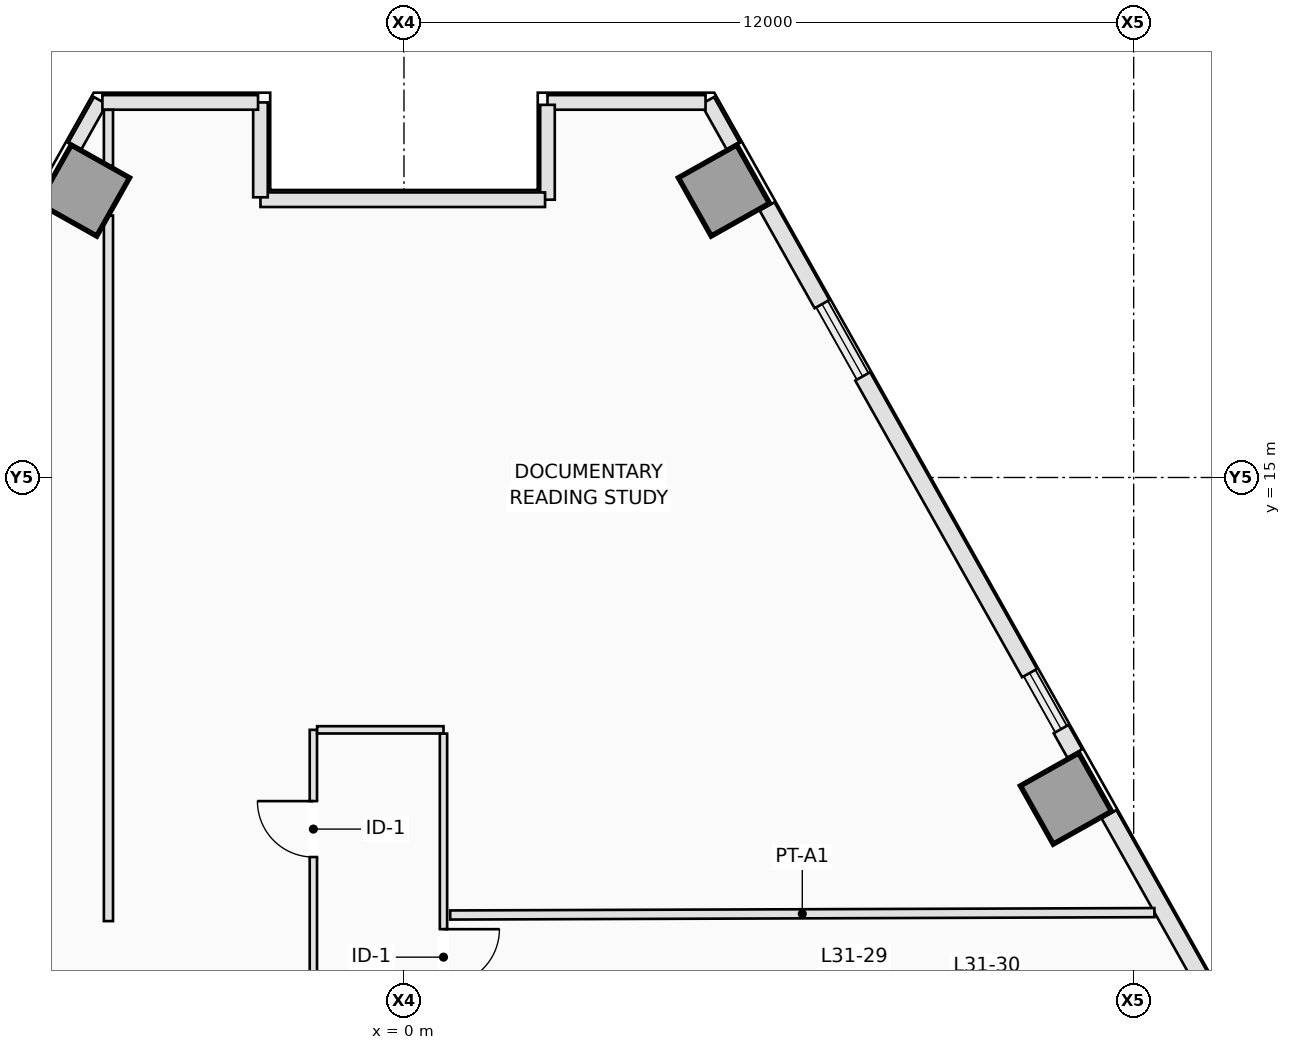
"""IFC4 building model, lengths in metres.
Left out: names, types, materials, properties, quantities, classifications, styles, units other than length and angle.
Written with IfcOpenShell. Run it as: python <this file> out.ifc"""

import sys

from ifc_helpers import new_model, si_unit, direction, frame, frame_2d, origin, origin_2d, place, context, subcontext, project, spatial, rectangle, extrude, element, fill, save


model = new_model("IFC4")
c1 = context("Model", 3, precision=1e-05, world=origin(), true_north=direction((0.0, 1.0)))
c2 = subcontext(c1, "Body", "Model", "MODEL_VIEW")
j1 = project(units=[si_unit("LENGTHUNIT", "METRE"), si_unit("PLANEANGLEUNIT", "RADIAN")], contexts=[c1])
p1 = place(None, origin())
s1 = spatial("IfcSite", under=j1, at=p1, CompositionType="ELEMENT")
p2 = place(p1, origin())
s2 = spatial("IfcBuilding", under=s1, at=p2, CompositionType="ELEMENT")
p3 = place(p2, frame((0.0, 0.0, 116.0)))
s3 = spatial("IfcBuildingStorey", under=s2, at=p3, CompositionType="ELEMENT", Elevation=116.0)
for number, where, z_axis, x_axis in (
    (1, (10.887, 9.72, 0.0), (0.0, 0.0, 1.0), (0.872, 0.49, 0.0)),
    (2, (5.262, 19.719, 0.0), (0.0, 0.0, 1.0), (0.872, 0.49, 0.0)),
    (3, (-5.262, 19.719, 0.0), (0.0, 0.0, 1.0), (-0.872, 0.49, 0.0)),
):
    element("IfcColumn", number, at=place(p3, frame(where, z_axis=z_axis, x_axis=x_axis)), inside=s3, PredefinedType="COLUMN", context=c2, shape_type="SweptSolid", body=[
        extrude(rectangle(XDim=1.1, YDim=1.1, at=origin_2d()), origin(), (0.0, 0.0, 1.0), 3.5),
    ])
p4 = place(p3, frame((4.993, 21.197, 0.0), z_axis=(0.0, 0.0, 1.0), x_axis=(0.490355003566, -0.871522788272, 0.0)))
e4 = element("IfcWall", 4, at=p4, inside=s3, PredefinedType="STANDARD", context=c2, shape_type="SweptSolid", body=[
    extrude(rectangle(XDim=0.865, YDim=0.24, at=frame_2d((0.433, 0.0))), origin(), (0.0, 0.0, 1.0), 3.25),
])
p5 = place(p3, frame((5.971, 19.458, 0.0), z_axis=(0.0, 0.0, 1.0), x_axis=(0.490280102884, -0.871564926277, 0.0)))
e5 = element("IfcWall", 5, at=p5, inside=s3, PredefinedType="STANDARD", context=c2, shape_type="SweptSolid", body=[
    extrude(rectangle(XDim=1.844, YDim=0.28, at=frame_2d((0.922, 0.0))), origin(), (0.0, 0.0, 1.0), 3.25),
])
p6 = place(p3, frame((7.544, 16.662, 0.0), z_axis=(0.0, 0.0, 1.0), x_axis=(0.490298514233, -0.871554569113, 0.0)))
e6 = element("IfcWall", 6, at=p6, inside=s3, PredefinedType="STANDARD", context=c2, shape_type="SweptSolid", body=[
    extrude(rectangle(XDim=5.597, YDim=0.28, at=frame_2d((2.799, 0.0))), origin(), (0.0, 0.0, 1.0), 3.25),
])
p7 = place(p3, frame((10.806, 10.862, 0.0), z_axis=(0.0, 0.0, 1.0), x_axis=(0.490412424957, -0.871490478116, 0.0)))
e7 = element("IfcWall", 7, at=p7, inside=s3, PredefinedType="STANDARD", context=c2, shape_type="SweptSolid", body=[
    extrude(rectangle(XDim=0.46, YDim=0.28, at=frame_2d((0.23, 0.0))), origin(), (0.0, 0.0, 1.0), 3.25),
])
p8 = place(p3, frame((11.593, 9.463, 0.0), z_axis=(0.0, 0.0, 1.0), x_axis=(0.490293592365, -0.871557337922, 0.0)))
e8 = element("IfcWall", 8, at=p8, inside=s3, PredefinedType="STANDARD", context=c2, shape_type="SweptSolid", body=[
    extrude(rectangle(XDim=4.299, YDim=0.28, at=frame_2d((2.15, 0.0))), origin(), (0.0, 0.0, 1.0), 3.25),
])
p9 = place(p3, frame((-5.417, 20.443, 0.0), z_axis=(0.0, 0.0, 1.0), x_axis=(0.490355003566, 0.871522788272, 0.0)))
e9 = element("IfcWall", 9, at=p9, inside=s3, PredefinedType="STANDARD", context=c2, shape_type="SweptSolid", body=[
    extrude(rectangle(XDim=0.865, YDim=0.24, at=frame_2d((0.433, 0.0))), origin(), (0.0, 0.0, 1.0), 3.25),
])
p10 = place(p3, frame((4.959, 21.168, 0.0), z_axis=(0.0, 0.0, 1.0), x_axis=(-1.0, 0.0, 0.0)))
e10 = element("IfcWall", 10, at=p10, inside=s3, PredefinedType="STANDARD", context=c2, shape_type="SweptSolid", body=[
    extrude(rectangle(XDim=2.599, YDim=0.24, at=frame_2d((1.3, 0.0))), origin(), (0.0, 0.0, 1.0), 3.25),
])
p11 = place(p3, frame((2.36, 21.128, 0.0), z_axis=(0.0, 0.0, 1.0), x_axis=(0.0, -1.0, 0.0)))
e11 = element("IfcWall", 11, at=p11, inside=s3, PredefinedType="STANDARD", context=c2, shape_type="SweptSolid", body=[
    extrude(rectangle(XDim=1.56, YDim=0.24, at=frame_2d((0.78, 0.0))), origin(), (0.0, 0.0, 1.0), 3.25),
])
p12 = place(p3, frame((2.32, 19.568, 0.0), z_axis=(0.0, 0.0, 1.0), x_axis=(-1.0, 0.0, 0.0)))
e12 = element("IfcWall", 12, at=p12, inside=s3, PredefinedType="STANDARD", context=c2, shape_type="SweptSolid", body=[
    extrude(rectangle(XDim=4.68, YDim=0.24, at=frame_2d((2.34, 0.0))), origin(), (0.0, 0.0, 1.0), 2.722),
])
p13 = place(p3, frame((-2.36, 19.608, 0.0), z_axis=(0.0, 0.0, 1.0), x_axis=(0.0, 1.0, 0.0)))
e13 = element("IfcWall", 13, at=p13, inside=s3, PredefinedType="STANDARD", context=c2, shape_type="SweptSolid", body=[
    extrude(rectangle(XDim=1.56, YDim=0.24, at=frame_2d((0.78, 0.0))), origin(), (0.0, 0.0, 1.0), 3.25),
])
p14 = place(p3, frame((-2.4, 21.168, 0.0), z_axis=(0.0, 0.0, 1.0), x_axis=(-1.0, 0.0, 0.0)))
e14 = element("IfcWall", 14, at=p14, inside=s3, PredefinedType="STANDARD", context=c2, shape_type="SweptSolid", body=[
    extrude(rectangle(XDim=2.56, YDim=0.24, at=frame_2d((1.28, 0.0))), origin(), (0.0, 0.0, 1.0), 3.25),
])
p15 = place(p3, frame((-1.49, -2.338, 0.0), z_axis=(0.0, 0.0, 1.0), x_axis=(0.0, 1.0, 0.0)))
e15 = element("IfcWall", 15, at=p15, inside=s3, PredefinedType="PARTITIONING", context=c2, shape_type="SweptSolid", body=[
    extrude(rectangle(XDim=13.188, YDim=0.12, at=frame_2d((6.594, 0.0))), origin(), (0.0, 0.0, 1.0), 3.25),
])
p16 = place(p15, frame((11.096, 0.0, 0.0)))
e16 = element("IfcOpeningElement", 16, at=p16, cuts=e15, PredefinedType="OPENING", context=c2, shape_type="SweptSolid", body=[
    extrude(rectangle(XDim=0.92, YDim=2.12, at=frame_2d((0.46, 1.06))), frame((0.0, 0.07, 0.0), z_axis=(0.0, -1.0, 0.0), x_axis=(1.0, 0.0, 0.0)), (0.0, 0.0, 1.0), 0.14),
])
p17 = place(p15, frame((5.078, 0.0, 0.0)))
e17 = element("IfcOpeningElement", 17, at=p17, cuts=e15, PredefinedType="OPENING", context=c2, shape_type="SweptSolid", body=[
    extrude(rectangle(XDim=0.92, YDim=2.12, at=frame_2d((0.46, 1.06))), frame((0.0, 0.07, 0.0), z_axis=(0.0, -1.0, 0.0), x_axis=(1.0, 0.0, 0.0)), (0.0, 0.0, 1.0), 0.14),
])
p18 = place(p15, frame((1.622, 0.0, 0.0)))
e18 = element("IfcOpeningElement", 18, at=p18, cuts=e15, PredefinedType="OPENING", context=c2, shape_type="SweptSolid", body=[
    extrude(rectangle(XDim=0.92, YDim=2.12, at=frame_2d((0.46, 1.06))), frame((0.0, 0.07, 0.0), z_axis=(0.0, -1.0, 0.0), x_axis=(1.0, 0.0, 0.0)), (0.0, 0.0, 1.0), 0.14),
])
p19 = place(p3, frame((-1.428, 10.85, 0.0), z_axis=(0.0, 0.0, 1.0), x_axis=(1.0, 0.0, 0.0)))
e19 = element("IfcWall", 19, at=p19, inside=s3, PredefinedType="PARTITIONING", context=c2, shape_type="SweptSolid", body=[
    extrude(rectangle(XDim=2.078, YDim=0.12, at=frame_2d((1.039, 0.0))), origin(), (0.0, 0.0, 1.0), 3.25),
])
p20 = place(p3, frame((0.65, 10.788, 0.0), z_axis=(0.0, 0.0, 1.0), x_axis=(0.0, -1.0, 0.0)))
e20 = element("IfcWall", 20, at=p20, inside=s3, PredefinedType="PARTITIONING", context=c2, shape_type="SweptSolid", body=[
    extrude(rectangle(XDim=13.188, YDim=0.12, at=frame_2d((6.594, 0.0))), origin(), (0.0, 0.0, 1.0), 3.25),
])
p21 = place(p20, frame((3.216, 0.0, 0.0)))
e21 = element("IfcOpeningElement", 21, at=p21, cuts=e20, PredefinedType="OPENING", context=c2, shape_type="SweptSolid", body=[
    extrude(rectangle(XDim=0.92, YDim=2.12, at=frame_2d((0.46, 1.06))), frame((0.0, 0.07, 0.0), z_axis=(0.0, -1.0, 0.0), x_axis=(1.0, 0.0, 0.0)), (0.0, 0.0, 1.0), 0.14),
])
p22 = place(p20, frame((5.04, 0.0, 0.0)))
e22 = element("IfcOpeningElement", 22, at=p22, cuts=e20, PredefinedType="OPENING", context=c2, shape_type="SweptSolid", body=[
    extrude(rectangle(XDim=0.92, YDim=2.12, at=frame_2d((0.46, 1.06))), frame((0.0, 0.07, 0.0), z_axis=(0.0, -1.0, 0.0), x_axis=(1.0, 0.0, 0.0)), (0.0, 0.0, 1.0), 0.14),
])
p23 = place(p20, frame((9.321, 0.0, 0.0)))
e23 = element("IfcOpeningElement", 23, at=p23, cuts=e20, PredefinedType="OPENING", context=c2, shape_type="SweptSolid", body=[
    extrude(rectangle(XDim=0.92, YDim=2.12, at=frame_2d((0.46, 1.06))), frame((0.0, 0.07, 0.0), z_axis=(0.0, -1.0, 0.0), x_axis=(1.0, 0.0, 0.0)), (0.0, 0.0, 1.0), 0.14),
])
p24 = place(p3, frame((12.341, 7.844, 0.0), z_axis=(0.0, 0.0, 1.0), x_axis=(-0.999994240273, -0.003394027167, 0.0)))
e24 = element("IfcWall", 24, at=p24, inside=s3, PredefinedType="PARTITIONING", context=c2, shape_type="SweptSolid", body=[
    extrude(rectangle(XDim=11.581, YDim=0.15, at=frame_2d((5.791, 0.0))), origin(), (0.0, 0.0, 1.0), 3.25),
])
p25 = place(p3, frame((-4.86, 7.705, 0.0), z_axis=(0.0, 0.0, 1.0), x_axis=(0.0, 1.0, 0.0)))
e25 = element("IfcWall", 25, at=p25, inside=s3, PredefinedType="PARTITIONING", context=c2, shape_type="SweptSolid", body=[
    extrude(rectangle(XDim=11.604, YDim=0.15, at=frame_2d((5.802, 0.0))), origin(), (0.0, 0.0, 1.0), 2.648),
])
p26 = place(p3, frame((-4.86, 20.126, 0.0), z_axis=(0.0, 0.0, 1.0), x_axis=(0.0, 1.0, 0.0)))
e26 = element("IfcWall", 26, at=p26, inside=s3, PredefinedType="PARTITIONING", context=c2, shape_type="SweptSolid", body=[
    extrude(rectangle(XDim=0.92, YDim=0.15, at=frame_2d((0.46, 0.0))), origin(), (0.0, 0.0, 1.0), 3.25),
])
p27 = place(p16, origin())
e27 = element("IfcDoor", 27, at=p27, inside=s3, OperationType="SINGLE_SWING_RIGHT", PredefinedType="DOOR", context=c2, shape_type="SweptSolid", body=[
    extrude(rectangle(XDim=0.92, YDim=2.12, at=frame_2d((0.46, 1.06))), frame((0.0, 0.025, 0.0), z_axis=(0.0, -1.0, 0.0), x_axis=(1.0, 0.0, 0.0)), (0.0, 0.0, 1.0), 0.05),
])
fill(e16, e27)
p28 = place(p21, origin())
e28 = element("IfcDoor", 28, at=p28, inside=s3, OperationType="SINGLE_SWING_LEFT", PredefinedType="DOOR", context=c2, shape_type="SweptSolid", body=[
    extrude(rectangle(XDim=0.92, YDim=2.12, at=frame_2d((0.46, 1.06))), frame((0.0, 0.025, 0.0), z_axis=(0.0, -1.0, 0.0), x_axis=(1.0, 0.0, 0.0)), (0.0, 0.0, 1.0), 0.05),
])
fill(e21, e28)
save(model, sys.argv[1])
